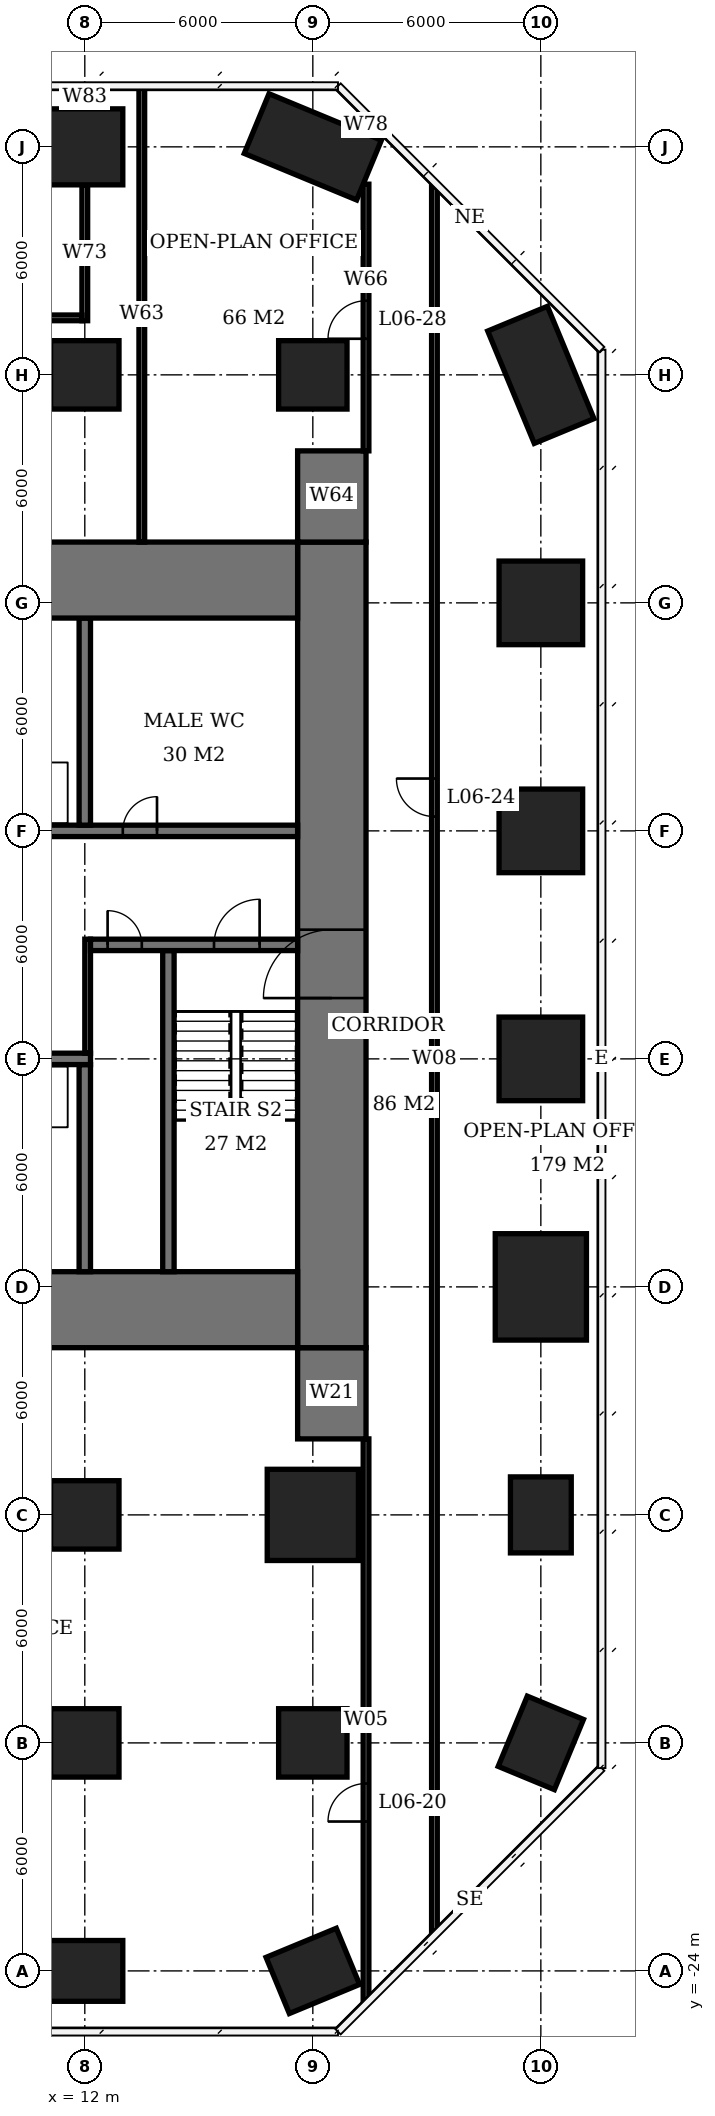
"""IFC4 building model, lengths in metres.
Left out: names, types, materials, properties, quantities, classifications, styles, units other than length and angle.
Written with IfcOpenShell. Run it as: python <this file> out.ifc"""

import sys

from ifc_helpers import new_model, si_unit, direction, frame, frame_2d, origin, origin_2d, place, context, subcontext, project, spatial, rectangle, extrude, element, fill, save


model = new_model("IFC4")
c1 = context("Model", 3, precision=1e-05, world=origin(), true_north=direction((0.0, 1.0)))
c2 = subcontext(c1, "Body", "Model", "MODEL_VIEW")
j1 = project(units=[si_unit("LENGTHUNIT", "METRE"), si_unit("PLANEANGLEUNIT", "RADIAN")], contexts=[c1])
p1 = place(None, origin())
s1 = spatial("IfcSite", under=j1, at=p1, CompositionType="ELEMENT")
p2 = place(p1, origin())
s2 = spatial("IfcBuilding", under=s1, at=p2, CompositionType="ELEMENT")
p3 = place(p2, frame((0.0, 0.0, 29.9)))
s3 = spatial("IfcBuildingStorey", under=s2, at=p3, CompositionType="ELEMENT", Elevation=29.9)
p4 = place(p3, frame((12.0, -24.0, 0.0), z_axis=(0.0, 0.0, 1.0), x_axis=(1.0, 0.0, 0.0)))
e1 = element("IfcColumn", 1, at=p4, inside=s3, PredefinedType="COLUMN", context=c2, shape_type="SweptSolid", body=[
    extrude(rectangle(XDim=2.0, YDim=1.6, at=origin_2d()), origin(), (0.0, 0.0, 1.0), 3.9),
])
for number, where, z_axis, x_axis in (
    (2, (12.0, -18.0, 0.0), (0.0, 0.0, 1.0), (1.0, 0.0, 0.0)),
    (3, (12.0, -12.0, 0.0), (0.0, 0.0, 1.0), (1.0, 0.0, 0.0)),
    (4, (12.0, 18.0, 0.0), (0.0, 0.0, 1.0), (1.0, 0.0, 0.0)),
):
    element("IfcColumn", number, at=place(p3, frame(where, z_axis=z_axis, x_axis=x_axis)), inside=s3, PredefinedType="COLUMN", context=c2, shape_type="SweptSolid", body=[
        extrude(rectangle(XDim=1.8, YDim=1.8, at=origin_2d()), origin(), (0.0, 0.0, 1.0), 3.9),
    ])
p5 = place(p3, frame((12.0, 24.0, 0.0), z_axis=(0.0, 0.0, 1.0), x_axis=(1.0, 0.0, 0.0)))
e5 = element("IfcColumn", 5, at=p5, inside=s3, PredefinedType="COLUMN", context=c2, shape_type="SweptSolid", body=[
    extrude(rectangle(XDim=2.0, YDim=2.0, at=origin_2d()), origin(), (0.0, 0.0, 1.0), 3.9),
])
p6 = place(p3, frame((18.0, -24.0, 0.0), z_axis=(0.0, 0.0, 1.0), x_axis=(-0.923879532511, -0.382683432365, 0.0)))
e6 = element("IfcColumn", 6, at=p6, inside=s3, PredefinedType="COLUMN", context=c2, shape_type="SweptSolid", body=[
    extrude(rectangle(XDim=2.0, YDim=1.6, at=origin_2d()), origin(), (0.0, 0.0, 1.0), 3.9),
])
p7 = place(p3, frame((18.0, -18.0, 0.0), z_axis=(0.0, 0.0, 1.0), x_axis=(1.0, 0.0, 0.0)))
e7 = element("IfcColumn", 7, at=p7, inside=s3, PredefinedType="COLUMN", context=c2, shape_type="SweptSolid", body=[
    extrude(rectangle(XDim=1.8, YDim=1.8, at=origin_2d()), origin(), (0.0, 0.0, 1.0), 3.9),
])
p8 = place(p3, frame((18.0, -12.0, 0.0), z_axis=(0.0, 0.0, 1.0), x_axis=(1.0, 0.0, 0.0)))
e8 = element("IfcColumn", 8, at=p8, inside=s3, PredefinedType="COLUMN", context=c2, shape_type="SweptSolid", body=[
    extrude(rectangle(XDim=2.4, YDim=2.4, at=origin_2d()), origin(), (0.0, 0.0, 1.0), 3.9),
])
p9 = place(p3, frame((18.0, 18.0, 0.0), z_axis=(0.0, 0.0, 1.0), x_axis=(1.0, 0.0, 0.0)))
e9 = element("IfcColumn", 9, at=p9, inside=s3, PredefinedType="COLUMN", context=c2, shape_type="SweptSolid", body=[
    extrude(rectangle(XDim=1.8, YDim=1.8, at=origin_2d()), origin(), (0.0, 0.0, 1.0), 3.9),
])
p10 = place(p3, frame((18.0, 24.0, 0.0), z_axis=(0.0, 0.0, 1.0), x_axis=(0.923879532511, -0.382683432365, 0.0)))
e10 = element("IfcColumn", 10, at=p10, inside=s3, PredefinedType="COLUMN", context=c2, shape_type="SweptSolid", body=[
    extrude(rectangle(XDim=3.2, YDim=1.7, at=origin_2d()), origin(), (0.0, 0.0, 1.0), 3.9),
])
for number, where, z_axis, x_axis in (
    (11, (24.0, -18.0, 0.0), (0.0, 0.0, 1.0), (-0.383, -0.924, 0.0)),
    (12, (24.0, -12.0, 0.0), (0.0, 0.0, 1.0), (0.0, 1.0, 0.0)),
):
    element("IfcColumn", number, at=place(p3, frame(where, z_axis=z_axis, x_axis=x_axis)), inside=s3, PredefinedType="COLUMN", context=c2, shape_type="SweptSolid", body=[
        extrude(rectangle(XDim=2.0, YDim=1.6, at=origin_2d()), origin(), (0.0, 0.0, 1.0), 3.9),
    ])
p11 = place(p3, frame((24.0, -6.0, 0.0), z_axis=(0.0, 0.0, 1.0), x_axis=(0.0, 1.0, 0.0)))
e13 = element("IfcColumn", 13, at=p11, inside=s3, PredefinedType="COLUMN", context=c2, shape_type="SweptSolid", body=[
    extrude(rectangle(XDim=2.8, YDim=2.4, at=origin_2d()), origin(), (0.0, 0.0, 1.0), 3.9),
])
for number, where, z_axis, x_axis in (
    (14, (24.0, 0.0, 0.0), (0.0, 0.0, 1.0), (1.0, 0.0, 0.0)),
    (15, (24.0, 6.0, 0.0), (0.0, 0.0, 1.0), (1.0, 0.0, 0.0)),
    (16, (24.0, 12.0, 0.0), (0.0, 0.0, 1.0), (1.0, 0.0, 0.0)),
):
    element("IfcColumn", number, at=place(p3, frame(where, z_axis=z_axis, x_axis=x_axis)), inside=s3, PredefinedType="COLUMN", context=c2, shape_type="SweptSolid", body=[
        extrude(rectangle(XDim=2.2, YDim=2.2, at=origin_2d()), origin(), (0.0, 0.0, 1.0), 3.9),
    ])
p12 = place(p3, frame((24.0, 18.0, 0.0), z_axis=(0.0, 0.0, 1.0), x_axis=(0.382683432365, -0.923879532511, 0.0)))
e17 = element("IfcColumn", 17, at=p12, inside=s3, PredefinedType="COLUMN", context=c2, shape_type="SweptSolid", body=[
    extrude(rectangle(XDim=3.2, YDim=1.7, at=origin_2d()), origin(), (0.0, 0.0, 1.0), 3.9),
])
for number, where, z_axis, x_axis in (
    (18, (-5.6, -6.6, 0.0), (0.0, 0.0, 1.0), (1.0, 0.0, 0.0)),
    (19, (-5.6, 12.6, 0.0), (0.0, 0.0, 1.0), (1.0, 0.0, 0.0)),
):
    element("IfcWall", number, at=place(p3, frame(where, z_axis=z_axis, x_axis=x_axis)), inside=s3, PredefinedType="SHEAR", context=c2, shape_type="SweptSolid", body=[
        extrude(rectangle(XDim=23.2, YDim=2.0, at=frame_2d((11.6, 0.0))), origin(), (0.0, 0.0, 1.0), 3.9),
    ])
p13 = place(p3, frame((18.5, -7.6, 0.0), z_axis=(0.0, 0.0, 1.0), x_axis=(0.0, 1.0, 0.0)))
e20 = element("IfcWall", 20, at=p13, inside=s3, PredefinedType="SHEAR", context=c2, shape_type="SweptSolid", body=[
    extrude(rectangle(XDim=21.2, YDim=1.8, at=frame_2d((10.6, 0.0))), origin(), (0.0, 0.0, 1.0), 3.9),
])
p14 = place(p13, frame((9.2, 0.0, 0.0)))
e21 = element("IfcOpeningElement", 21, at=p14, cuts=e20, PredefinedType="OPENING", context=c2, shape_type="SweptSolid", body=[
    extrude(rectangle(XDim=1.8, YDim=2.4, at=frame_2d((0.9, 1.2))), frame((0.0, 0.91, 0.0), z_axis=(0.0, -1.0, 0.0), x_axis=(1.0, 0.0, 0.0)), (0.0, 0.0, 1.0), 1.82),
])
for number, where, z_axis, x_axis in (
    (22, (18.5, -10.0, 0.0), (0.0, 0.0, 1.0), (0.0, 1.0, 0.0)),
    (23, (18.5, 13.6, 0.0), (0.0, 0.0, 1.0), (0.0, 1.0, 0.0)),
):
    element("IfcWall", number, at=place(p3, frame(where, z_axis=z_axis, x_axis=x_axis)), inside=s3, PredefinedType="SHEAR", context=c2, shape_type="SweptSolid", body=[
        extrude(rectangle(XDim=2.4, YDim=1.8, at=frame_2d((1.2, 0.0))), origin(), (0.0, 0.0, 1.0), 3.9),
    ])
p15 = place(p3, frame((-5.6, 0.0, 0.0), z_axis=(0.0, 0.0, 1.0), x_axis=(1.0, 0.0, 0.0)))
e24 = element("IfcWall", 24, at=p15, inside=s3, PredefinedType="SHEAR", context=c2, shape_type="SweptSolid", body=[
    extrude(rectangle(XDim=17.75, YDim=0.3, at=frame_2d((8.875, 0.0))), origin(), (0.0, 0.0, 1.0), 3.9),
])
p16 = place(p15, frame((0.6, 0.0, 0.0)))
e25 = element("IfcOpeningElement", 25, at=p16, cuts=e24, PredefinedType="OPENING", context=c2, shape_type="SweptSolid", body=[
    extrude(rectangle(XDim=0.9, YDim=2.1, at=frame_2d((0.45, 1.05))), frame((0.0, 0.16, 0.0), z_axis=(0.0, -1.0, 0.0), x_axis=(1.0, 0.0, 0.0)), (0.0, 0.0, 1.0), 0.32),
])
p17 = place(p15, frame((3.7, 0.0, 0.0)))
e26 = element("IfcOpeningElement", 26, at=p17, cuts=e24, PredefinedType="OPENING", context=c2, shape_type="SweptSolid", body=[
    extrude(rectangle(XDim=1.0, YDim=2.1, at=frame_2d((0.5, 1.05))), frame((0.0, 0.16, 0.0), z_axis=(0.0, -1.0, 0.0), x_axis=(1.0, 0.0, 0.0)), (0.0, 0.0, 1.0), 0.32),
])
p18 = place(p3, frame((12.15, 3.0, 0.0), z_axis=(0.0, 0.0, 1.0), x_axis=(1.0, 0.0, 0.0)))
e27 = element("IfcWall", 27, at=p18, inside=s3, PredefinedType="SHEAR", context=c2, shape_type="SweptSolid", body=[
    extrude(rectangle(XDim=5.45, YDim=0.3, at=frame_2d((2.725, 0.0))), origin(), (0.0, 0.0, 1.0), 3.9),
])
p19 = place(p18, frame((3.25, 0.0, 0.0)))
e28 = element("IfcOpeningElement", 28, at=p19, cuts=e27, PredefinedType="OPENING", context=c2, shape_type="SweptSolid", body=[
    extrude(rectangle(XDim=1.2, YDim=2.1, at=frame_2d((0.6, 1.05))), frame((0.0, 0.16, 0.0), z_axis=(0.0, -1.0, 0.0), x_axis=(1.0, 0.0, 0.0)), (0.0, 0.0, 1.0), 0.32),
])
p20 = place(p18, frame((0.45, 0.0, 0.0)))
e29 = element("IfcOpeningElement", 29, at=p20, cuts=e27, PredefinedType="OPENING", context=c2, shape_type="SweptSolid", body=[
    extrude(rectangle(XDim=0.9, YDim=2.1, at=frame_2d((0.45, 1.05))), frame((0.0, 0.16, 0.0), z_axis=(0.0, -1.0, 0.0), x_axis=(1.0, 0.0, 0.0)), (0.0, 0.0, 1.0), 0.32),
])
p21 = place(p3, frame((-0.15, 6.0, 0.0), z_axis=(0.0, 0.0, 1.0), x_axis=(1.0, 0.0, 0.0)))
e30 = element("IfcWall", 30, at=p21, inside=s3, PredefinedType="SHEAR", context=c2, shape_type="SweptSolid", body=[
    extrude(rectangle(XDim=17.75, YDim=0.3, at=frame_2d((8.875, 0.0))), origin(), (0.0, 0.0, 1.0), 3.9),
])
p22 = place(p21, frame((13.15, 0.0, 0.0)))
e31 = element("IfcOpeningElement", 31, at=p22, cuts=e30, PredefinedType="OPENING", context=c2, shape_type="SweptSolid", body=[
    extrude(rectangle(XDim=0.9, YDim=2.1, at=frame_2d((0.45, 1.05))), frame((0.0, 0.16, 0.0), z_axis=(0.0, -1.0, 0.0), x_axis=(1.0, 0.0, 0.0)), (0.0, 0.0, 1.0), 0.32),
])
p23 = place(p21, frame((1.1, 0.0, 0.0)))
e32 = element("IfcOpeningElement", 32, at=p23, cuts=e30, PredefinedType="OPENING", context=c2, shape_type="SweptSolid", body=[
    extrude(rectangle(XDim=1.1, YDim=2.1, at=frame_2d((0.55, 1.05))), frame((0.0, 0.16, 0.0), z_axis=(0.0, -1.0, 0.0), x_axis=(1.0, 0.0, 0.0)), (0.0, 0.0, 1.0), 0.32),
])
p24 = place(p21, frame((4.1, 0.0, 0.0)))
e33 = element("IfcOpeningElement", 33, at=p24, cuts=e30, PredefinedType="OPENING", context=c2, shape_type="SweptSolid", body=[
    extrude(rectangle(XDim=1.1, YDim=2.1, at=frame_2d((0.55, 1.05))), frame((0.0, 0.16, 0.0), z_axis=(0.0, -1.0, 0.0), x_axis=(1.0, 0.0, 0.0)), (0.0, 0.0, 1.0), 0.32),
])
p25 = place(p21, frame((7.1, 0.0, 0.0)))
e34 = element("IfcOpeningElement", 34, at=p25, cuts=e30, PredefinedType="OPENING", context=c2, shape_type="SweptSolid", body=[
    extrude(rectangle(XDim=1.1, YDim=2.1, at=frame_2d((0.55, 1.05))), frame((0.0, 0.16, 0.0), z_axis=(0.0, -1.0, 0.0), x_axis=(1.0, 0.0, 0.0)), (0.0, 0.0, 1.0), 0.32),
])
p26 = place(p21, frame((10.1, 0.0, 0.0)))
e35 = element("IfcOpeningElement", 35, at=p26, cuts=e30, PredefinedType="OPENING", context=c2, shape_type="SweptSolid", body=[
    extrude(rectangle(XDim=1.1, YDim=2.1, at=frame_2d((0.55, 1.05))), frame((0.0, 0.16, 0.0), z_axis=(0.0, -1.0, 0.0), x_axis=(1.0, 0.0, 0.0)), (0.0, 0.0, 1.0), 0.32),
])
for number, where, z_axis, x_axis in (
    (36, (12.0, -5.6, 0.0), (0.0, 0.0, 1.0), (0.0, 1.0, 0.0)),
    (37, (12.0, 6.15, 0.0), (0.0, 0.0, 1.0), (0.0, 1.0, 0.0)),
):
    element("IfcWall", number, at=place(p3, frame(where, z_axis=z_axis, x_axis=x_axis)), inside=s3, PredefinedType="SHEAR", context=c2, shape_type="SweptSolid", body=[
        extrude(rectangle(XDim=5.45, YDim=0.3, at=frame_2d((2.725, 0.0))), origin(), (0.0, 0.0, 1.0), 3.9),
    ])
p27 = place(p3, frame((14.2, -5.6, 0.0), z_axis=(0.0, 0.0, 1.0), x_axis=(0.0, 1.0, 0.0)))
e38 = element("IfcWall", 38, at=p27, inside=s3, PredefinedType="SHEAR", context=c2, shape_type="SweptSolid", body=[
    extrude(rectangle(XDim=8.45, YDim=0.3, at=frame_2d((4.225, 0.0))), origin(), (0.0, 0.0, 1.0), 3.9),
])
p28 = place(p3, frame((6.075, 19.5, 0.0), z_axis=(0.0, 0.0, 1.0), x_axis=(1.0, 0.0, 0.0)))
e39 = element("IfcWall", 39, at=p28, inside=s3, PredefinedType="PARTITIONING", context=c2, shape_type="SweptSolid", body=[
    extrude(rectangle(XDim=5.85, YDim=0.15, at=frame_2d((2.925, 0.0))), origin(), (0.0, 0.0, 1.0), 3.65),
])
p29 = place(p28, frame((2.425, 0.0, 0.0)))
e40 = element("IfcOpeningElement", 40, at=p29, cuts=e39, PredefinedType="OPENING", context=c2, shape_type="SweptSolid", body=[
    extrude(rectangle(XDim=1.0, YDim=2.1, at=frame_2d((0.5, 1.05))), frame((0.0, 0.085, 0.0), z_axis=(0.0, -1.0, 0.0), x_axis=(1.0, 0.0, 0.0)), (0.0, 0.0, 1.0), 0.17),
])
p30 = place(p3, frame((12.0, 19.425, 0.0), z_axis=(0.0, 0.0, 1.0), x_axis=(0.0, 1.0, 0.0)))
e41 = element("IfcWall", 41, at=p30, inside=s3, PredefinedType="PARTITIONING", context=c2, shape_type="SweptSolid", body=[
    extrude(rectangle(XDim=3.575, YDim=0.15, at=frame_2d((1.788, 0.0))), origin(), (0.0, 0.0, 1.0), 3.65),
])
p31 = place(p3, frame((12.0, 25.0, 0.0), z_axis=(0.0, 0.0, 1.0), x_axis=(0.0, 1.0, 0.0)))
e42 = element("IfcWall", 42, at=p31, inside=s3, PredefinedType="PARTITIONING", context=c2, shape_type="SweptSolid", body=[
    extrude(rectangle(XDim=0.6, YDim=0.15, at=frame_2d((0.3, 0.0))), origin(), (0.0, 0.0, 1.0), 3.65),
])
p32 = place(p3, frame((13.5, 13.6, 0.0), z_axis=(0.0, 0.0, 1.0), x_axis=(0.0, 1.0, 0.0)))
e43 = element("IfcWall", 43, at=p32, inside=s3, PredefinedType="PARTITIONING", context=c2, shape_type="SweptSolid", body=[
    extrude(rectangle(XDim=12.0, YDim=0.15, at=frame_2d((6.0, 0.0))), origin(), (0.0, 0.0, 1.0), 3.65),
])
p33 = place(p3, frame((19.4, -24.771, 0.0), z_axis=(0.0, 0.0, 1.0), x_axis=(0.0, 1.0, 0.0)))
e44 = element("IfcWall", 44, at=p33, inside=s3, PredefinedType="PARTITIONING", context=c2, shape_type="SweptSolid", body=[
    extrude(rectangle(XDim=14.771, YDim=0.15, at=frame_2d((7.385, 0.0))), origin(), (0.0, 0.0, 1.0), 3.65),
])
p34 = place(p33, frame((4.702, 0.0, 0.0)))
e45 = element("IfcOpeningElement", 45, at=p34, cuts=e44, PredefinedType="OPENING", context=c2, shape_type="SweptSolid", body=[
    extrude(rectangle(XDim=1.0, YDim=2.1, at=frame_2d((0.5, 1.05))), frame((0.0, 0.085, 0.0), z_axis=(0.0, -1.0, 0.0), x_axis=(1.0, 0.0, 0.0)), (0.0, 0.0, 1.0), 0.17),
])
p35 = place(p3, frame((19.4, 16.0, 0.0), z_axis=(0.0, 0.0, 1.0), x_axis=(0.0, 1.0, 0.0)))
e46 = element("IfcWall", 46, at=p35, inside=s3, PredefinedType="PARTITIONING", context=c2, shape_type="SweptSolid", body=[
    extrude(rectangle(XDim=7.018, YDim=0.15, at=frame_2d((3.509, 0.0))), origin(), (0.0, 0.0, 1.0), 3.65),
])
p36 = place(p35, frame((2.95, 0.0, 0.0)))
e47 = element("IfcOpeningElement", 47, at=p36, cuts=e46, PredefinedType="OPENING", context=c2, shape_type="SweptSolid", body=[
    extrude(rectangle(XDim=1.0, YDim=2.1, at=frame_2d((0.5, 1.05))), frame((0.0, 0.085, 0.0), z_axis=(0.0, -1.0, 0.0), x_axis=(1.0, 0.0, 0.0)), (0.0, 0.0, 1.0), 0.17),
])
p37 = place(p3, frame((19.4, 24.371, 0.0), z_axis=(0.0, 0.0, 1.0), x_axis=(0.0, 1.0, 0.0)))
e48 = element("IfcWall", 48, at=p37, inside=s3, PredefinedType="PARTITIONING", context=c2, shape_type="SweptSolid", body=[
    extrude(rectangle(XDim=0.4, YDim=0.15, at=frame_2d((0.2, 0.0))), origin(), (0.0, 0.0, 1.0), 3.65),
])
p38 = place(p3, frame((21.2, -22.971, 0.0), z_axis=(0.0, 0.0, 1.0), x_axis=(0.0, 1.0, 0.0)))
e49 = element("IfcWall", 49, at=p38, inside=s3, PredefinedType="PARTITIONING", context=c2, shape_type="SweptSolid", body=[
    extrude(rectangle(XDim=45.942, YDim=0.15, at=frame_2d((22.971, 0.0))), origin(), (0.0, 0.0, 1.0), 3.65),
])
p39 = place(p38, frame((29.348, 0.0, 0.0)))
e50 = element("IfcOpeningElement", 50, at=p39, cuts=e49, PredefinedType="OPENING", context=c2, shape_type="SweptSolid", body=[
    extrude(rectangle(XDim=1.0, YDim=2.1, at=frame_2d((0.5, 1.05))), frame((0.0, 0.085, 0.0), z_axis=(0.0, -1.0, 0.0), x_axis=(1.0, 0.0, 0.0)), (0.0, 0.0, 1.0), 0.17),
])
p40 = place(p3, frame((12.075, 0.15, 0.0), z_axis=(0.0, 0.0, 1.0), x_axis=(0.0, 1.0, 0.0)))
e51 = element("IfcWall", 51, at=p40, inside=s3, PredefinedType="PARTITIONING", context=c2, shape_type="SweptSolid", body=[
    extrude(rectangle(XDim=3.0, YDim=0.15, at=frame_2d((1.5, 0.0))), origin(), (0.0, 0.0, 1.0), 3.65),
])
p41 = place(p14, origin())
e52 = element("IfcDoor", 52, at=p41, inside=s3, OperationType="DOUBLE_DOOR_SINGLE_SWING", PredefinedType="DOOR", context=c2, shape_type="SweptSolid", body=[
    extrude(rectangle(XDim=1.8, YDim=2.4, at=frame_2d((0.9, 1.2))), frame((0.0, 0.025, 0.0), z_axis=(0.0, -1.0, 0.0), x_axis=(1.0, 0.0, 0.0)), (0.0, 0.0, 1.0), 0.05),
])
fill(e21, e52)
p42 = place(p19, origin())
e53 = element("IfcDoor", 53, at=p42, inside=s3, OperationType="SINGLE_SWING_RIGHT", PredefinedType="DOOR", context=c2, shape_type="SweptSolid", body=[
    extrude(rectangle(XDim=1.2, YDim=2.1, at=frame_2d((0.6, 1.05))), frame((0.0, 0.025, 0.0), z_axis=(0.0, -1.0, 0.0), x_axis=(1.0, 0.0, 0.0)), (0.0, 0.0, 1.0), 0.05),
])
fill(e28, e53)
p43 = place(p20, origin())
e54 = element("IfcDoor", 54, at=p43, inside=s3, OperationType="SINGLE_SWING_LEFT", PredefinedType="DOOR", context=c2, shape_type="SweptSolid", body=[
    extrude(rectangle(XDim=0.9, YDim=2.1, at=frame_2d((0.45, 1.05))), frame((0.0, 0.025, 0.0), z_axis=(0.0, -1.0, 0.0), x_axis=(1.0, 0.0, 0.0)), (0.0, 0.0, 1.0), 0.05),
])
fill(e29, e54)
p44 = place(p22, origin())
e55 = element("IfcDoor", 55, at=p44, inside=s3, OperationType="SINGLE_SWING_RIGHT", PredefinedType="DOOR", context=c2, shape_type="SweptSolid", body=[
    extrude(rectangle(XDim=0.9, YDim=2.1, at=frame_2d((0.45, 1.05))), frame((0.0, 0.025, 0.0), z_axis=(0.0, -1.0, 0.0), x_axis=(1.0, 0.0, 0.0)), (0.0, 0.0, 1.0), 0.05),
])
fill(e31, e55)
p45 = place(p34, origin())
e56 = element("IfcDoor", 56, at=p45, inside=s3, OperationType="SINGLE_SWING_LEFT", PredefinedType="DOOR", context=c2, shape_type="SweptSolid", body=[
    extrude(rectangle(XDim=1.0, YDim=2.1, at=frame_2d((0.5, 1.05))), frame((0.0, 0.025, 0.0), z_axis=(0.0, -1.0, 0.0), x_axis=(1.0, 0.0, 0.0)), (0.0, 0.0, 1.0), 0.05),
])
fill(e45, e56)
p46 = place(p39, origin())
e57 = element("IfcDoor", 57, at=p46, inside=s3, OperationType="SINGLE_SWING_RIGHT", PredefinedType="DOOR", context=c2, shape_type="SweptSolid", body=[
    extrude(rectangle(XDim=1.0, YDim=2.1, at=frame_2d((0.5, 1.05))), frame((0.0, 0.025, 0.0), z_axis=(0.0, -1.0, 0.0), x_axis=(1.0, 0.0, 0.0)), (0.0, 0.0, 1.0), 0.05),
])
fill(e50, e57)
p47 = place(p36, origin())
e58 = element("IfcDoor", 58, at=p47, inside=s3, OperationType="SINGLE_SWING_LEFT", PredefinedType="DOOR", context=c2, shape_type="SweptSolid", body=[
    extrude(rectangle(XDim=1.0, YDim=2.1, at=frame_2d((0.5, 1.05))), frame((0.0, 0.025, 0.0), z_axis=(0.0, -1.0, 0.0), x_axis=(1.0, 0.0, 0.0)), (0.0, 0.0, 1.0), 0.05),
])
fill(e47, e58)
save(model, sys.argv[1])
